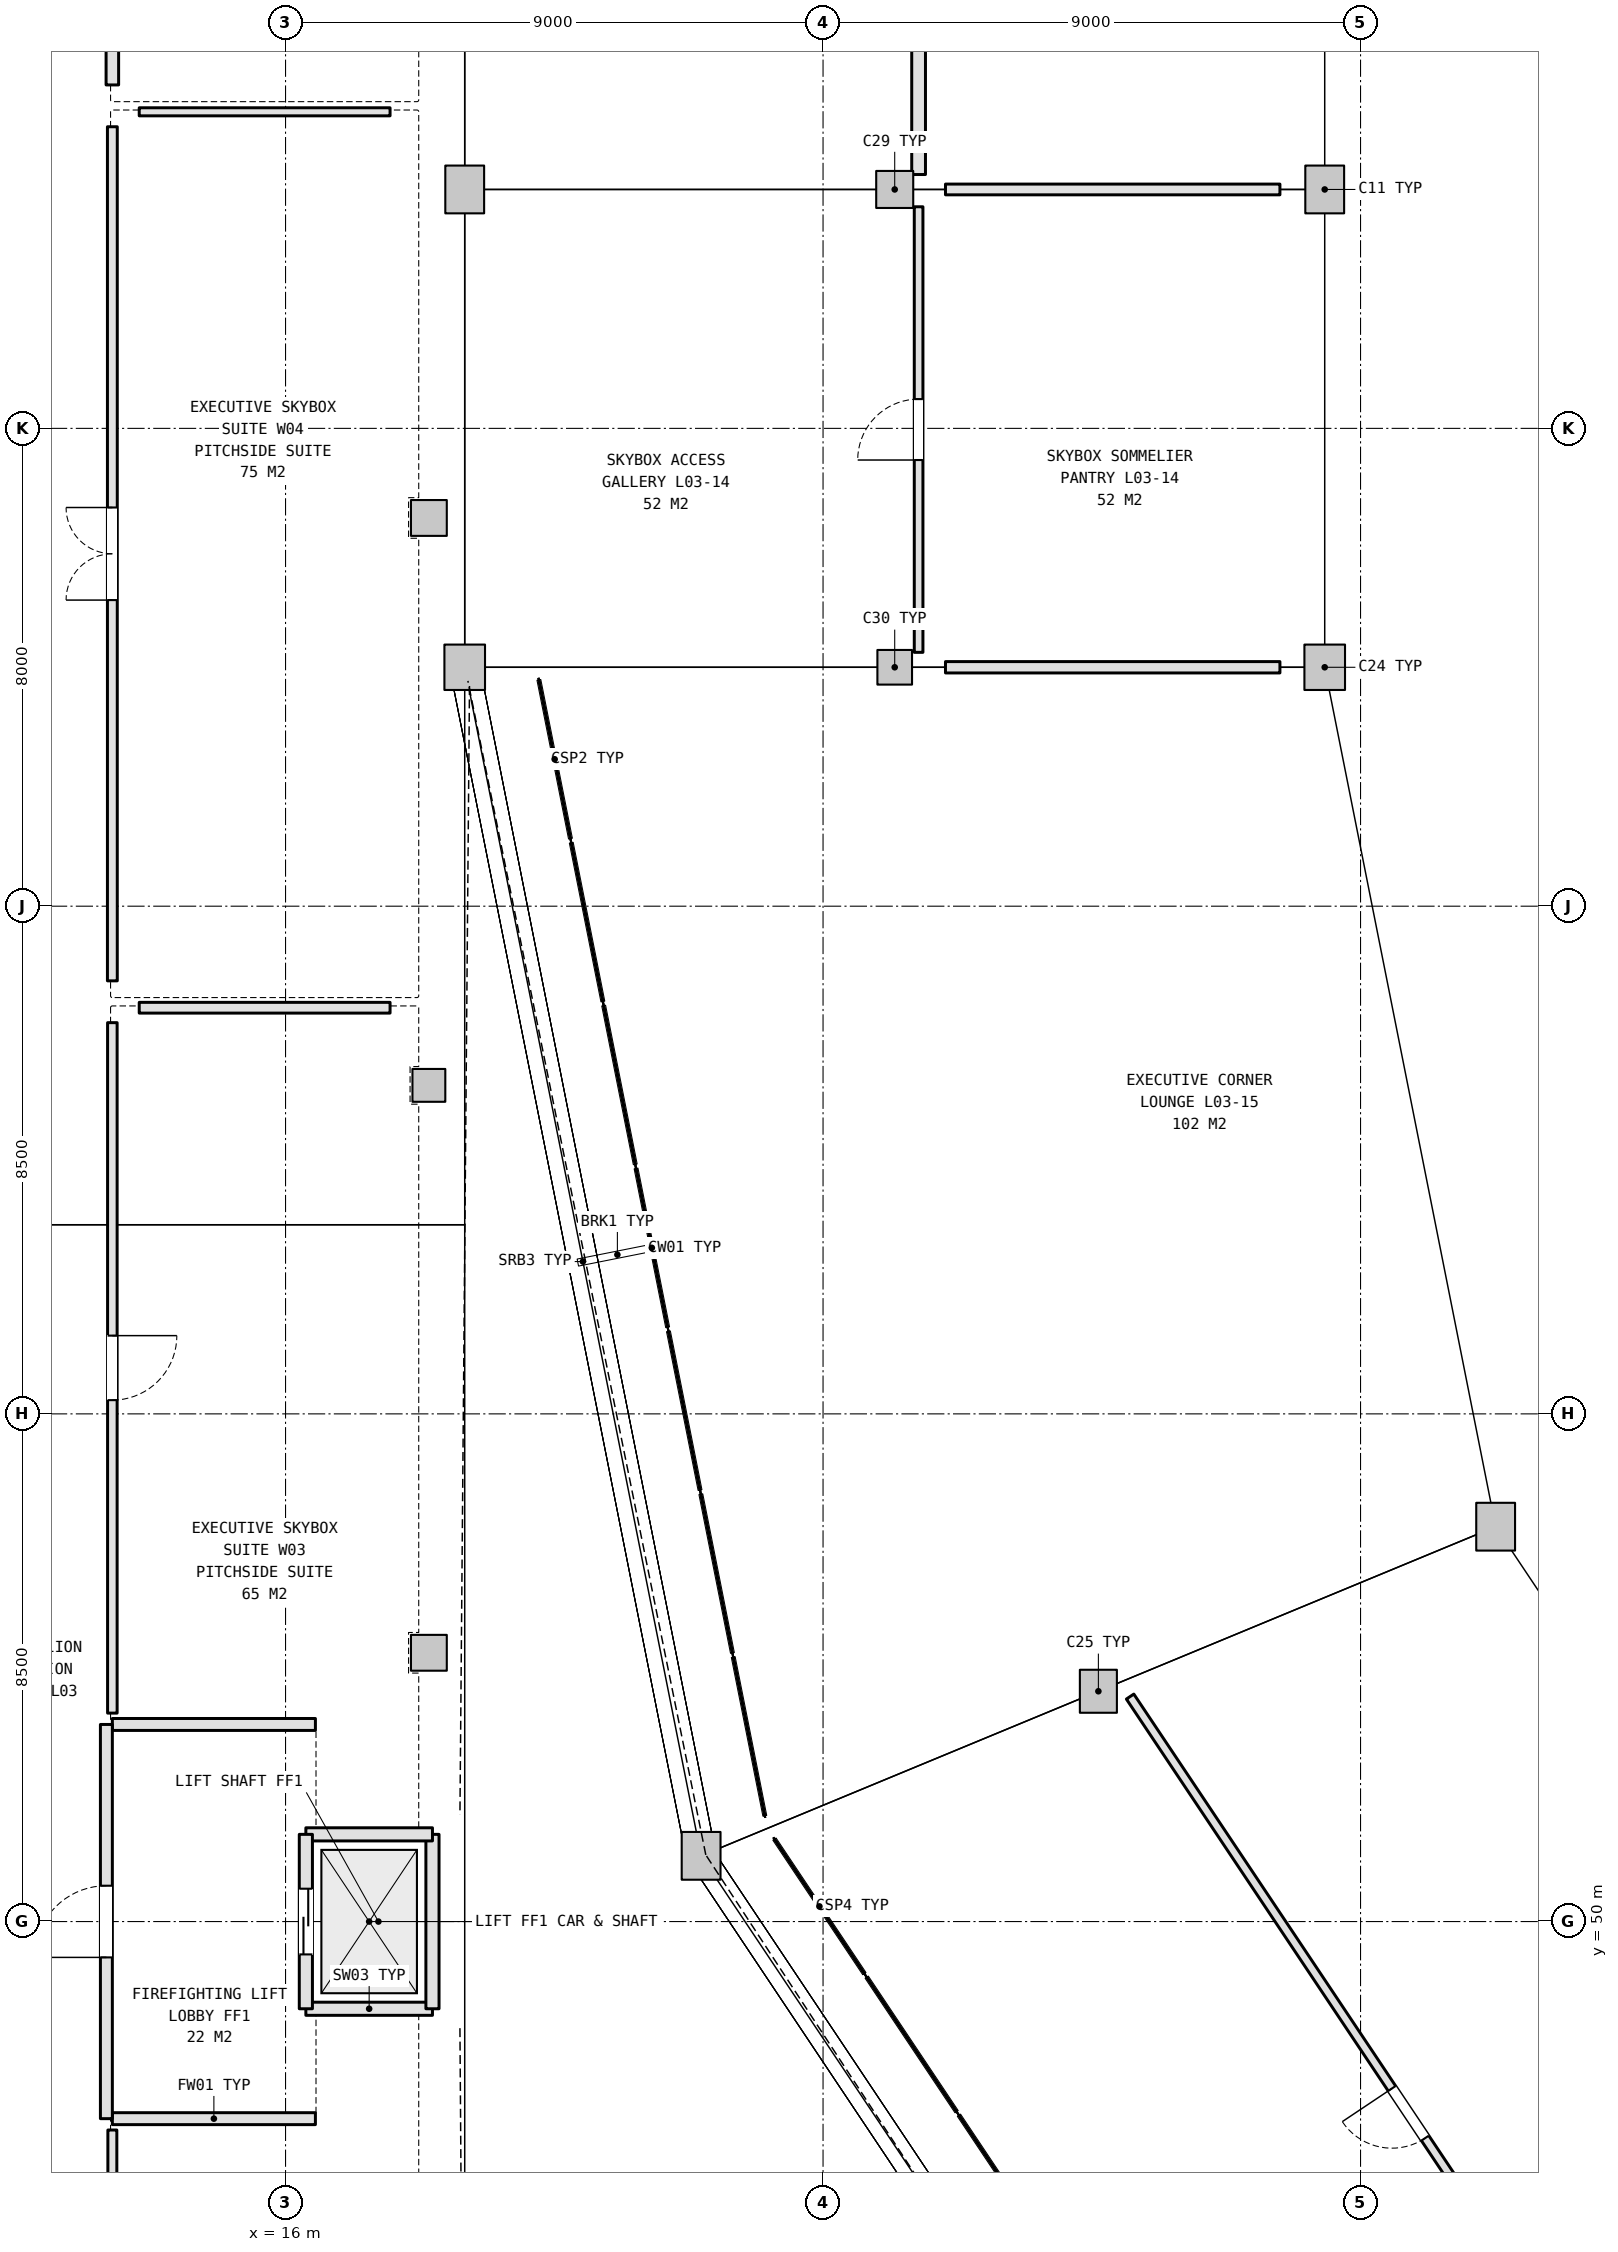
"""IFC4 building model, lengths in metres.
Left out: names, types, materials, properties, quantities, classifications, styles, units other than length and angle.
Written with IfcOpenShell. Run it as: python <this file> out.ifc"""

import sys

from ifc_helpers import new_model, si_unit, direction, frame, frame_2d, origin, origin_2d, place, context, subcontext, project, spatial, rectangle, extrude, element, fill, save


model = new_model("IFC4")
c1 = context("Model", 3, precision=1e-05, world=origin(), true_north=direction((0.0, 1.0)))
c2 = subcontext(c1, "Body", "Model", "MODEL_VIEW")
j1 = project(units=[si_unit("LENGTHUNIT", "METRE"), si_unit("PLANEANGLEUNIT", "RADIAN")], contexts=[c1])
p1 = place(None, origin())
s1 = spatial("IfcSite", under=j1, at=p1, CompositionType="ELEMENT")
p2 = place(p1, origin())
s2 = spatial("IfcBuilding", under=s1, at=p2, CompositionType="ELEMENT")
p3 = place(p2, frame((0.0, 0.0, 16.2)))
s3 = spatial("IfcBuildingStorey", under=s2, at=p3, CompositionType="ELEMENT", Elevation=16.2)
p4 = place(p3, frame((33.4, 79.0, 0.0), z_axis=(0.0, 0.0, 1.0), x_axis=(1.0, 0.0, 0.0)))
e1 = element("IfcColumn", 1, at=p4, inside=s3, PredefinedType="COLUMN", context=c2, shape_type="SweptSolid", body=[
    extrude(rectangle(XDim=0.65, YDim=0.8, at=origin_2d()), origin(), (0.0, 0.0, 1.0), 5.4),
])
p5 = place(p3, frame((26.2, 79.0, 0.0), z_axis=(0.0, 0.0, 1.0), x_axis=(1.0, 0.0, 0.0)))
e2 = element("IfcColumn", 2, at=p5, inside=s3, PredefinedType="COLUMN", context=c2, shape_type="SweptSolid", body=[
    extrude(rectangle(XDim=0.62, YDim=0.62, at=origin_2d()), origin(), (0.0, 0.0, 1.0), 5.4),
])
p6 = place(p3, frame((19.0, 79.0, 0.0), z_axis=(0.0, 0.0, 1.0), x_axis=(1.0, 0.0, 0.0)))
e3 = element("IfcColumn", 3, at=p6, inside=s3, PredefinedType="COLUMN", context=c2, shape_type="SweptSolid", body=[
    extrude(rectangle(XDim=0.65, YDim=0.8, at=origin_2d()), origin(), (0.0, 0.0, 1.0), 5.4),
])
p7 = place(p3, frame((33.4, 71.0, 0.0), z_axis=(0.0, 0.0, 1.0), x_axis=(1.0, 0.0, 0.0)))
e4 = element("IfcColumn", 4, at=p7, inside=s3, PredefinedType="COLUMN", context=c2, shape_type="SweptSolid", body=[
    extrude(rectangle(XDim=0.68, YDim=0.76, at=origin_2d()), origin(), (0.0, 0.0, 1.0), 5.4),
])
p8 = place(p3, frame((26.2, 71.0, 0.0), z_axis=(0.0, 0.0, 1.0), x_axis=(1.0, 0.0, 0.0)))
e5 = element("IfcColumn", 5, at=p8, inside=s3, PredefinedType="COLUMN", context=c2, shape_type="SweptSolid", body=[
    extrude(rectangle(XDim=0.58, YDim=0.58, at=origin_2d()), origin(), (0.0, 0.0, 1.0), 5.4),
])
p9 = place(p3, frame((19.0, 71.0, 0.0), z_axis=(0.0, 0.0, 1.0), x_axis=(1.0, 0.0, 0.0)))
e6 = element("IfcColumn", 6, at=p9, inside=s3, PredefinedType="COLUMN", context=c2, shape_type="SweptSolid", body=[
    extrude(rectangle(XDim=0.68, YDim=0.76, at=origin_2d()), origin(), (0.0, 0.0, 1.0), 5.4),
])
p10 = place(p3, frame((36.262, 56.611, 0.0), z_axis=(0.0, 0.0, 1.0), x_axis=(1.0, 0.0, 0.0)))
e7 = element("IfcColumn", 7, at=p10, inside=s3, PredefinedType="COLUMN", context=c2, shape_type="SweptSolid", body=[
    extrude(rectangle(XDim=0.65, YDim=0.8, at=origin_2d()), origin(), (0.0, 0.0, 1.0), 5.4),
])
p11 = place(p3, frame((29.61, 53.856, 0.0), z_axis=(0.0, 0.0, 1.0), x_axis=(1.0, 0.0, 0.0)))
e8 = element("IfcColumn", 8, at=p11, inside=s3, PredefinedType="COLUMN", context=c2, shape_type="SweptSolid", body=[
    extrude(rectangle(XDim=0.62, YDim=0.72, at=origin_2d()), origin(), (0.0, 0.0, 1.0), 5.4),
])
p12 = place(p3, frame((22.958, 51.1, 0.0), z_axis=(0.0, 0.0, 1.0), x_axis=(1.0, 0.0, 0.0)))
e9 = element("IfcColumn", 9, at=p12, inside=s3, PredefinedType="COLUMN", context=c2, shape_type="SweptSolid", body=[
    extrude(rectangle(XDim=0.65, YDim=0.8, at=origin_2d()), origin(), (0.0, 0.0, 1.0), 5.4),
])
p13 = place(p3, frame((18.4, 54.5, 0.0), z_axis=(0.0, 0.0, 1.0), x_axis=(1.0, 0.0, 0.0)))
e10 = element("IfcColumn", 10, at=p13, inside=s3, PredefinedType="COLUMN", context=c2, shape_type="SweptSolid", body=[
    extrude(rectangle(XDim=0.6, YDim=0.6, at=origin_2d()), origin(), (0.0, 0.0, 1.0), 5.4),
])
p14 = place(p3, frame((18.4, 64.0, 0.0), z_axis=(0.0, 0.0, 1.0), x_axis=(1.0, 0.0, 0.0)))
e11 = element("IfcColumn", 11, at=p14, inside=s3, PredefinedType="COLUMN", context=c2, shape_type="SweptSolid", body=[
    extrude(rectangle(XDim=0.55, YDim=0.55, at=origin_2d()), origin(), (0.0, 0.0, 1.0), 5.4),
])
p15 = place(p3, frame((18.4, 73.5, 0.0), z_axis=(0.0, 0.0, 1.0), x_axis=(1.0, 0.0, 0.0)))
e12 = element("IfcColumn", 12, at=p15, inside=s3, PredefinedType="COLUMN", context=c2, shape_type="SweptSolid", body=[
    extrude(rectangle(XDim=0.6, YDim=0.6, at=origin_2d()), origin(), (0.0, 0.0, 1.0), 5.4),
])
p16 = place(p3, frame((16.34, 48.54, 0.0), z_axis=(0.0, 0.0, 1.0), x_axis=(1.0, 0.0, 0.0)))
e13 = element("IfcWall", 13, at=p16, inside=s3, PredefinedType="SHEAR", context=c2, shape_type="SweptSolid", body=[
    extrude(rectangle(XDim=2.12, YDim=0.22, at=frame_2d((1.06, 0.0))), origin(), (0.0, 0.0, 1.0), 5.14),
])
p17 = place(p3, frame((18.46, 48.54, 0.0), z_axis=(0.0, 0.0, 1.0), x_axis=(0.0, 1.0, 0.0)))
e14 = element("IfcWall", 14, at=p17, inside=s3, PredefinedType="SHEAR", context=c2, shape_type="SweptSolid", body=[
    extrude(rectangle(XDim=2.92, YDim=0.22, at=frame_2d((1.46, 0.0))), origin(), (0.0, 0.0, 1.0), 5.14),
])
p18 = place(p3, frame((18.46, 51.46, 0.0), z_axis=(0.0, 0.0, 1.0), x_axis=(-1.0, 0.0, 0.0)))
e15 = element("IfcWall", 15, at=p18, inside=s3, PredefinedType="SHEAR", context=c2, shape_type="SweptSolid", body=[
    extrude(rectangle(XDim=2.12, YDim=0.22, at=frame_2d((1.06, 0.0))), origin(), (0.0, 0.0, 1.0), 5.14),
])
p19 = place(p3, frame((16.34, 51.46, 0.0), z_axis=(0.0, 0.0, 1.0), x_axis=(0.0, -1.0, 0.0)))
e16 = element("IfcWall", 16, at=p19, inside=s3, PredefinedType="SHEAR", context=c2, shape_type="SweptSolid", body=[
    extrude(rectangle(XDim=2.92, YDim=0.22, at=frame_2d((1.46, 0.0))), origin(), (0.0, 0.0, 1.0), 5.14),
])
p20 = place(p19, frame((0.91, 0.0, 0.0)))
e17 = element("IfcOpeningElement", 17, at=p20, cuts=e16, PredefinedType="OPENING", context=c2, shape_type="SweptSolid", body=[
    extrude(rectangle(XDim=1.1, YDim=2.2, at=frame_2d((0.55, 1.1))), frame((0.0, 0.12, 0.0), z_axis=(0.0, -1.0, 0.0), x_axis=(1.0, 0.0, 0.0)), (0.0, 0.0, 1.0), 0.24),
])
for number, where, z_axis, x_axis in (
    (18, (13.1, 46.7, 0.0), (0.0, 0.0, 1.0), (1.0, 0.0, 0.0)),
    (19, (16.5, 53.3, 0.0), (0.0, 0.0, 1.0), (-1.0, 0.0, 0.0)),
):
    element("IfcWall", number, at=place(p3, frame(where, z_axis=z_axis, x_axis=x_axis)), inside=s3, PredefinedType="SOLIDWALL", context=c2, shape_type="SweptSolid", body=[
        extrude(rectangle(XDim=3.4, YDim=0.2, at=frame_2d((1.7, 0.0))), origin(), (0.0, 0.0, 1.0), 5.12),
    ])
p21 = place(p3, frame((13.0, 53.3, 0.0), z_axis=(0.0, 0.0, 1.0), x_axis=(0.0, -1.0, 0.0)))
e20 = element("IfcWall", 20, at=p21, inside=s3, PredefinedType="SOLIDWALL", context=c2, shape_type="SweptSolid", body=[
    extrude(rectangle(XDim=6.6, YDim=0.2, at=frame_2d((3.3, 0.0))), origin(), (0.0, 0.0, 1.0), 5.12),
])
p22 = place(p21, frame((2.7, 0.0, 0.0)))
e21 = element("IfcOpeningElement", 21, at=p22, cuts=e20, PredefinedType="OPENING", context=c2, shape_type="SweptSolid", body=[
    extrude(rectangle(XDim=1.2, YDim=2.2, at=frame_2d((0.6, 1.1))), frame((0.0, 0.11, 0.0), z_axis=(0.0, -1.0, 0.0), x_axis=(1.0, 0.0, 0.0)), (0.0, 0.0, 1.0), 0.22),
])
p23 = place(p3, frame((13.1, 35.75, 0.0), z_axis=(0.0, 0.0, 1.0), x_axis=(0.0, 1.0, 0.0)))
e22 = element("IfcWall", 22, at=p23, inside=s3, PredefinedType="PARTITIONING", context=c2, shape_type="SweptSolid", body=[
    extrude(rectangle(XDim=10.76, YDim=0.15, at=frame_2d((5.38, 0.0))), origin(), (0.0, 0.0, 1.0), 4.668),
])
p24 = place(p23, frame((4.88, 0.0, 0.0)))
e23 = element("IfcOpeningElement", 23, at=p24, cuts=e22, PredefinedType="OPENING", context=c2, shape_type="SweptSolid", body=[
    extrude(rectangle(XDim=1.0, YDim=2.15, at=frame_2d((0.5, 1.075))), frame((0.0, 0.085, 0.0), z_axis=(0.0, -1.0, 0.0), x_axis=(1.0, 0.0, 0.0)), (0.0, 0.0, 1.0), 0.17),
])
p25 = place(p3, frame((13.1, 53.49, 0.0), z_axis=(0.0, 0.0, 1.0), x_axis=(0.0, 1.0, 0.0)))
e24 = element("IfcWall", 24, at=p25, inside=s3, PredefinedType="PARTITIONING", context=c2, shape_type="SweptSolid", body=[
    extrude(rectangle(XDim=11.56, YDim=0.16, at=frame_2d((5.78, 0.0))), origin(), (0.0, 0.0, 1.0), 4.668),
])
p26 = place(p25, frame((5.24, 0.0, 0.0)))
e25 = element("IfcOpeningElement", 25, at=p26, cuts=e24, PredefinedType="OPENING", context=c2, shape_type="SweptSolid", body=[
    extrude(rectangle(XDim=1.08, YDim=2.25, at=frame_2d((0.54, 1.125))), frame((0.0, 0.09, 0.0), z_axis=(0.0, -1.0, 0.0), x_axis=(1.0, 0.0, 0.0)), (0.0, 0.0, 1.0), 0.18),
])
p27 = place(p3, frame((13.55, 65.3, 0.0), z_axis=(0.0, 0.0, 1.0), x_axis=(1.0, 0.0, 0.0)))
e26 = element("IfcWall", 26, at=p27, inside=s3, PredefinedType="PARTITIONING", context=c2, shape_type="SweptSolid", body=[
    extrude(rectangle(XDim=4.2, YDim=0.18, at=frame_2d((2.1, 0.0))), origin(), (0.0, 0.0, 1.0), 5.12),
])
p28 = place(p3, frame((13.1, 65.75, 0.0), z_axis=(0.0, 0.0, 1.0), x_axis=(0.0, 1.0, 0.0)))
e27 = element("IfcWall", 27, at=p28, inside=s3, PredefinedType="PARTITIONING", context=c2, shape_type="SweptSolid", body=[
    extrude(rectangle(XDim=14.3, YDim=0.165, at=frame_2d((7.15, 0.0))), origin(), (0.0, 0.0, 1.0), 4.668),
])
p29 = place(p28, frame((6.375, 0.0, 0.0)))
e28 = element("IfcOpeningElement", 28, at=p29, cuts=e27, PredefinedType="OPENING", context=c2, shape_type="SweptSolid", body=[
    extrude(rectangle(XDim=1.55, YDim=2.15, at=frame_2d((0.775, 1.075))), frame((0.0, 0.093, 0.0), z_axis=(0.0, -1.0, 0.0), x_axis=(1.0, 0.0, 0.0)), (0.0, 0.0, 1.0), 0.185),
])
p30 = place(p3, frame((13.55, 80.3, 0.0), z_axis=(0.0, 0.0, 1.0), x_axis=(1.0, 0.0, 0.0)))
e29 = element("IfcWall", 29, at=p30, inside=s3, PredefinedType="PARTITIONING", context=c2, shape_type="SweptSolid", body=[
    extrude(rectangle(XDim=4.2, YDim=0.135, at=frame_2d((2.1, 0.0))), origin(), (0.0, 0.0, 1.0), 5.12),
])
p31 = place(p3, frame((13.1, 80.75, 0.0), z_axis=(0.0, 0.0, 1.0), x_axis=(0.0, 1.0, 0.0)))
e30 = element("IfcWall", 30, at=p31, inside=s3, PredefinedType="PLUMBINGWALL", context=c2, shape_type="SweptSolid", body=[
    extrude(rectangle(XDim=10.76, YDim=0.21, at=frame_2d((5.38, 0.0))), origin(), (0.0, 0.0, 1.0), 4.668),
])
p32 = place(p31, frame((4.48, 0.0, 0.0)))
e31 = element("IfcOpeningElement", 31, at=p32, cuts=e30, PredefinedType="OPENING", context=c2, shape_type="SweptSolid", body=[
    extrude(rectangle(XDim=1.8, YDim=2.2, at=frame_2d((0.9, 1.1))), frame((0.0, 0.115, 0.0), z_axis=(0.0, -1.0, 0.0), x_axis=(1.0, 0.0, 0.0)), (0.0, 0.0, 1.0), 0.23),
])
p33 = place(p3, frame((26.6, 79.25, 0.0), z_axis=(0.0, 0.0, 1.0), x_axis=(0.0, 1.0, 0.0)))
e32 = element("IfcWall", 32, at=p33, inside=s3, PredefinedType="PLUMBINGWALL", context=c2, shape_type="SweptSolid", body=[
    extrude(rectangle(XDim=7.46, YDim=0.23, at=frame_2d((3.73, 0.0))), origin(), (0.0, 0.0, 1.0), 4.375),
])
p34 = place(p33, frame((3.24, 0.0, 0.0)))
e33 = element("IfcOpeningElement", 33, at=p34, cuts=e32, PredefinedType="OPENING", context=c2, shape_type="SweptSolid", body=[
    extrude(rectangle(XDim=0.98, YDim=2.15, at=frame_2d((0.49, 1.075))), frame((0.0, 0.125, 0.0), z_axis=(0.0, -1.0, 0.0), x_axis=(1.0, 0.0, 0.0)), (0.0, 0.0, 1.0), 0.25),
])
p35 = place(p3, frame((32.65, 79.0, 0.0), z_axis=(0.0, 0.0, 1.0), x_axis=(-1.0, 0.0, 0.0)))
e34 = element("IfcWall", 34, at=p35, inside=s3, PredefinedType="PARTITIONING", context=c2, shape_type="SweptSolid", body=[
    extrude(rectangle(XDim=5.6, YDim=0.18, at=frame_2d((2.8, 0.0))), origin(), (0.0, 0.0, 1.0), 4.365),
])
p36 = place(p3, frame((26.6, 71.25, 0.0), z_axis=(0.0, 0.0, 1.0), x_axis=(0.0, 1.0, 0.0)))
e35 = element("IfcWall", 35, at=p36, inside=s3, PredefinedType="PARTITIONING", context=c2, shape_type="SweptSolid", body=[
    extrude(rectangle(XDim=7.46, YDim=0.145, at=frame_2d((3.73, 0.0))), origin(), (0.0, 0.0, 1.0), 4.365),
])
p37 = place(p36, frame((3.22, 0.0, 0.0)))
e36 = element("IfcOpeningElement", 36, at=p37, cuts=e35, PredefinedType="OPENING", context=c2, shape_type="SweptSolid", body=[
    extrude(rectangle(XDim=1.02, YDim=2.15, at=frame_2d((0.51, 1.075))), frame((0.0, 0.083, 0.0), z_axis=(0.0, -1.0, 0.0), x_axis=(1.0, 0.0, 0.0)), (0.0, 0.0, 1.0), 0.165),
])
p38 = place(p3, frame((32.65, 71.0, 0.0), z_axis=(0.0, 0.0, 1.0), x_axis=(-1.0, 0.0, 0.0)))
e37 = element("IfcWall", 37, at=p38, inside=s3, PredefinedType="PARTITIONING", context=c2, shape_type="SweptSolid", body=[
    extrude(rectangle(XDim=5.6, YDim=0.19, at=frame_2d((2.8, 0.0))), origin(), (0.0, 0.0, 1.0), 4.385),
])
p39 = place(p3, frame((39.466, 39.812, 0.0), z_axis=(0.0, 0.0, 1.0), x_axis=(-0.555572701103, 0.831467963177, 0.0)))
e38 = element("IfcWall", 38, at=p39, inside=s3, PredefinedType="PARTITIONING", context=c2, shape_type="SweptSolid", body=[
    extrude(rectangle(XDim=16.783, YDim=0.15, at=frame_2d((8.392, 0.0))), origin(), (0.0, 0.0, 1.0), 4.305),
])
p40 = place(p39, frame((7.892, 0.0, 0.0)))
e39 = element("IfcOpeningElement", 39, at=p40, cuts=e38, PredefinedType="OPENING", context=c2, shape_type="SweptSolid", body=[
    extrude(rectangle(XDim=1.0, YDim=2.15, at=frame_2d((0.5, 1.075))), frame((0.0, 0.085, 0.0), z_axis=(0.0, -1.0, 0.0), x_axis=(1.0, 0.0, 0.0)), (0.0, 0.0, 1.0), 0.17),
])
p41 = place(p20, origin())
e40 = element("IfcDoor", 40, at=p41, inside=s3, OperationType="DOUBLE_DOOR_SLIDING", PredefinedType="DOOR", context=c2, shape_type="SweptSolid", body=[
    extrude(rectangle(XDim=1.1, YDim=2.2, at=frame_2d((0.55, 1.1))), frame((0.0, 0.025, 0.0), z_axis=(0.0, -1.0, 0.0), x_axis=(1.0, 0.0, 0.0)), (0.0, 0.0, 1.0), 0.05),
])
fill(e17, e40)
p42 = place(p22, frame((1.2, 0.0, 0.0), z_axis=(0.0, 0.0, 1.0), x_axis=(-1.0, 0.0, 0.0)))
e41 = element("IfcDoor", 41, at=p42, inside=s3, OperationType="SINGLE_SWING_RIGHT", PredefinedType="DOOR", context=c2, shape_type="SweptSolid", body=[
    extrude(rectangle(XDim=1.2, YDim=2.2, at=frame_2d((0.6, 1.1))), frame((0.0, 0.025, 0.0), z_axis=(0.0, -1.0, 0.0), x_axis=(1.0, 0.0, 0.0)), (0.0, 0.0, 1.0), 0.05),
])
fill(e21, e41)
p43 = place(p26, frame((1.08, 0.0, 0.0), z_axis=(0.0, 0.0, 1.0), x_axis=(-1.0, 0.0, 0.0)))
e42 = element("IfcDoor", 42, at=p43, inside=s3, OperationType="SINGLE_SWING_RIGHT", PredefinedType="DOOR", context=c2, shape_type="SweptSolid", body=[
    extrude(rectangle(XDim=1.08, YDim=2.25, at=frame_2d((0.54, 1.125))), frame((0.0, 0.025, 0.0), z_axis=(0.0, -1.0, 0.0), x_axis=(1.0, 0.0, 0.0)), (0.0, 0.0, 1.0), 0.05),
])
fill(e25, e42)
p44 = place(p29, origin())
e43 = element("IfcDoor", 43, at=p44, inside=s3, OperationType="DOUBLE_DOOR_SINGLE_SWING", PredefinedType="DOOR", context=c2, shape_type="SweptSolid", body=[
    extrude(rectangle(XDim=1.55, YDim=2.15, at=frame_2d((0.775, 1.075))), frame((0.0, 0.025, 0.0), z_axis=(0.0, -1.0, 0.0), x_axis=(1.0, 0.0, 0.0)), (0.0, 0.0, 1.0), 0.05),
])
fill(e28, e43)
p45 = place(p37, origin())
e44 = element("IfcDoor", 44, at=p45, inside=s3, OperationType="SINGLE_SWING_LEFT", PredefinedType="DOOR", context=c2, shape_type="SweptSolid", body=[
    extrude(rectangle(XDim=1.02, YDim=2.15, at=frame_2d((0.51, 1.075))), frame((0.0, 0.025, 0.0), z_axis=(0.0, -1.0, 0.0), x_axis=(1.0, 0.0, 0.0)), (0.0, 0.0, 1.0), 0.05),
])
fill(e36, e44)
p46 = place(p40, origin())
e45 = element("IfcDoor", 45, at=p46, inside=s3, OperationType="SINGLE_SWING_RIGHT", PredefinedType="DOOR", context=c2, shape_type="SweptSolid", body=[
    extrude(rectangle(XDim=1.0, YDim=2.15, at=frame_2d((0.5, 1.075))), frame((0.0, 0.025, 0.0), z_axis=(0.0, -1.0, 0.0), x_axis=(1.0, 0.0, 0.0)), (0.0, 0.0, 1.0), 0.05),
])
fill(e39, e45)
save(model, sys.argv[1])
